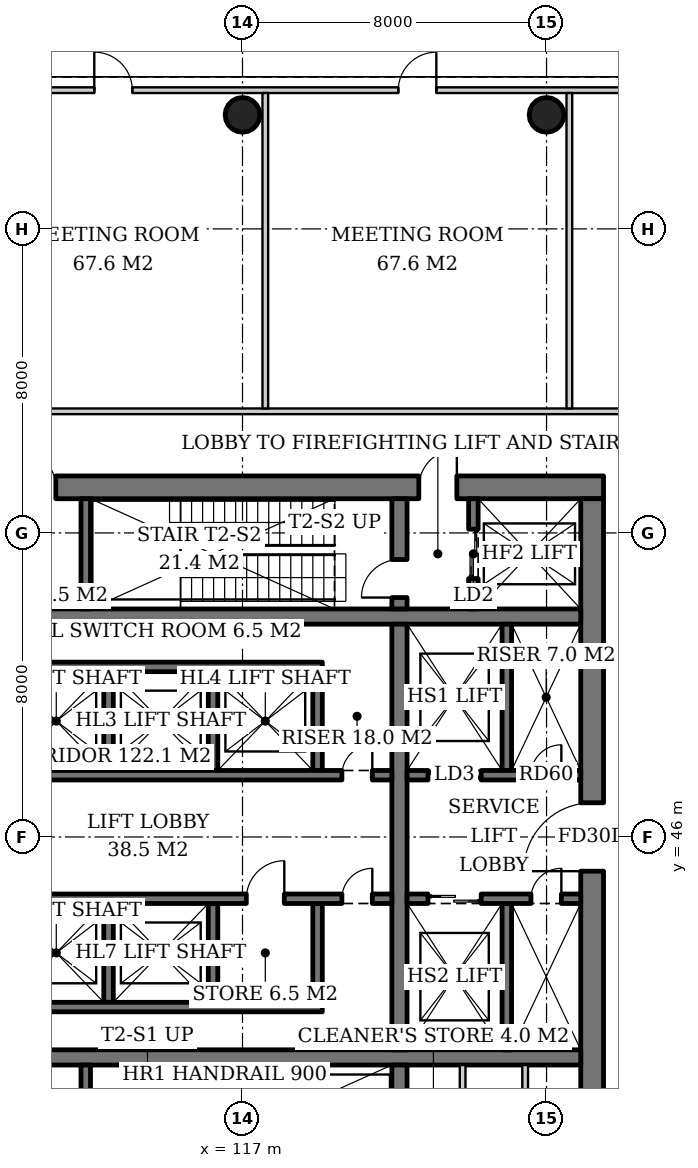
"""IFC4 building model, lengths in metres.
Left out: names, types, materials, properties, quantities, classifications, styles, units other than length and angle.
Written with IfcOpenShell. Run it as: python <this file> out.ifc"""

import sys

from ifc_helpers import new_model, si_unit, direction, frame, frame_2d, origin, origin_2d, place, context, subcontext, project, spatial, rectangle, hollow_circle, extrude, element, fill, save


model = new_model("IFC4")
c1 = context("Model", 3, precision=1e-05, world=origin(), true_north=direction((0.0, 1.0)))
c2 = subcontext(c1, "Body", "Model", "MODEL_VIEW")
j1 = project(units=[si_unit("LENGTHUNIT", "METRE"), si_unit("PLANEANGLEUNIT", "RADIAN")], contexts=[c1])
p1 = place(None, origin())
s1 = spatial("IfcSite", under=j1, at=p1, CompositionType="ELEMENT")
p2 = place(p1, origin())
s2 = spatial("IfcBuilding", under=s1, at=p2, CompositionType="ELEMENT")
p3 = place(p2, frame((0.0, 0.0, 11.0)))
s3 = spatial("IfcBuildingStorey", under=s2, at=p3, CompositionType="ELEMENT", Elevation=11.0)
for number, where, z_axis, x_axis in (
    (1, (125.0, 65.0, 0.0), (0.0, 0.0, 1.0), (1.0, 0.0, 0.0)),
    (2, (117.0, 65.0, 0.0), (0.0, 0.0, 1.0), (1.0, 0.0, 0.0)),
):
    element("IfcColumn", number, at=place(p3, frame(where, z_axis=z_axis, x_axis=x_axis)), inside=s3, PredefinedType="COLUMN", context=c2, shape_type="SweptSolid", body=[
        extrude(hollow_circle(Radius=0.457, WallThickness=0.03, at=origin_2d()), origin(), (0.0, 0.0, 1.0), 5.0),
    ])
p4 = place(p3, frame((107.5, 55.2, 0.0), z_axis=(0.0, 0.0, 1.0), x_axis=(1.0, 0.0, 0.0)))
e3 = element("IfcWall", 3, at=p4, inside=s3, PredefinedType="SHEAR", context=c2, shape_type="SweptSolid", body=[
    extrude(rectangle(XDim=19.0, YDim=0.6, at=frame_2d((9.5, 0.0))), origin(), (0.0, 0.0, 1.0), 5.0),
])
p5 = place(p4, frame((14.14, 0.0, 0.0)))
e4 = element("IfcOpeningElement", 4, at=p5, cuts=e3, PredefinedType="OPENING", context=c2, shape_type="SweptSolid", body=[
    extrude(rectangle(XDim=1.0, YDim=2.1, at=frame_2d((0.5, 1.05))), frame((0.0, 0.31, 0.0), z_axis=(0.0, -1.0, 0.0), x_axis=(1.0, 0.0, 0.0)), (0.0, 0.0, 1.0), 0.62),
])
p6 = place(p4, frame((1.675, 0.0, 0.0)))
e5 = element("IfcOpeningElement", 5, at=p6, cuts=e3, PredefinedType="OPENING", context=c2, shape_type="SweptSolid", body=[
    extrude(rectangle(XDim=1.0, YDim=2.1, at=frame_2d((0.5, 1.05))), frame((0.0, 0.31, 0.0), z_axis=(0.0, -1.0, 0.0), x_axis=(1.0, 0.0, 0.0)), (0.0, 0.0, 1.0), 0.62),
])
p7 = place(p4, frame((3.587, 0.0, 0.0)))
e6 = element("IfcOpeningElement", 6, at=p7, cuts=e3, PredefinedType="OPENING", context=c2, shape_type="SweptSolid", body=[
    extrude(rectangle(XDim=1.0, YDim=2.1, at=frame_2d((0.5, 1.05))), frame((0.0, 0.31, 0.0), z_axis=(0.0, -1.0, 0.0), x_axis=(1.0, 0.0, 0.0)), (0.0, 0.0, 1.0), 0.62),
])
p8 = place(p3, frame((126.2, 37.1, 0.0), z_axis=(0.0, 0.0, 1.0), x_axis=(0.0, 1.0, 0.0)))
e7 = element("IfcWall", 7, at=p8, inside=s3, PredefinedType="SHEAR", context=c2, shape_type="SweptSolid", body=[
    extrude(rectangle(XDim=17.8, YDim=0.6, at=frame_2d((8.9, 0.0))), origin(), (0.0, 0.0, 1.0), 5.0),
])
p9 = place(p8, frame((8.0, 0.0, 0.0)))
e8 = element("IfcOpeningElement", 8, at=p9, cuts=e7, PredefinedType="OPENING", context=c2, shape_type="SweptSolid", body=[
    extrude(rectangle(XDim=1.8, YDim=2.4, at=frame_2d((0.9, 1.2))), frame((0.0, 0.31, 0.0), z_axis=(0.0, -1.0, 0.0), x_axis=(1.0, 0.0, 0.0)), (0.0, 0.0, 1.0), 0.62),
])
for number, where, z_axis, x_axis in (
    (9, (108.1, 40.2, 0.0), (0.0, 0.0, 1.0), (1.0, 0.0, 0.0)),
    (10, (108.1, 51.8, 0.0), (0.0, 0.0, 1.0), (1.0, 0.0, 0.0)),
):
    element("IfcWall", number, at=place(p3, frame(where, z_axis=z_axis, x_axis=x_axis)), inside=s3, PredefinedType="SHEAR", context=c2, shape_type="SweptSolid", body=[
        extrude(rectangle(XDim=17.8, YDim=0.4, at=frame_2d((8.9, 0.0))), origin(), (0.0, 0.0, 1.0), 5.0),
    ])
p10 = place(p3, frame((121.13, 37.1, 0.0), z_axis=(0.0, 0.0, 1.0), x_axis=(0.0, 1.0, 0.0)))
e11 = element("IfcWall", 11, at=p10, inside=s3, PredefinedType="SHEAR", context=c2, shape_type="SweptSolid", body=[
    extrude(rectangle(XDim=2.9, YDim=0.4, at=frame_2d((1.45, 0.0))), origin(), (0.0, 0.0, 1.0), 5.0),
])
p11 = place(p3, frame((121.13, 40.4, 0.0), z_axis=(0.0, 0.0, 1.0), x_axis=(0.0, 1.0, 0.0)))
e12 = element("IfcWall", 12, at=p11, inside=s3, PredefinedType="SHEAR", context=c2, shape_type="SweptSolid", body=[
    extrude(rectangle(XDim=11.2, YDim=0.4, at=frame_2d((5.6, 0.0))), origin(), (0.0, 0.0, 1.0), 5.0),
])
p12 = place(p3, frame((121.13, 52.0, 0.0), z_axis=(0.0, 0.0, 1.0), x_axis=(0.0, 1.0, 0.0)))
e13 = element("IfcWall", 13, at=p12, inside=s3, PredefinedType="SHEAR", context=c2, shape_type="SweptSolid", body=[
    extrude(rectangle(XDim=2.9, YDim=0.4, at=frame_2d((1.45, 0.0))), origin(), (0.0, 0.0, 1.0), 5.0),
])
p13 = place(p12, frame((0.3, 0.0, 0.0)))
e14 = element("IfcOpeningElement", 14, at=p13, cuts=e13, PredefinedType="OPENING", context=c2, shape_type="SweptSolid", body=[
    extrude(rectangle(XDim=1.0, YDim=2.1, at=frame_2d((0.5, 1.05))), frame((0.0, 0.21, 0.0), z_axis=(0.0, -1.0, 0.0), x_axis=(1.0, 0.0, 0.0)), (0.0, 0.0, 1.0), 0.42),
])
p14 = place(p3, frame((112.875, 37.1, 0.0), z_axis=(0.0, 0.0, 1.0), x_axis=(0.0, 1.0, 0.0)))
e15 = element("IfcWall", 15, at=p14, inside=s3, PredefinedType="SHEAR", context=c2, shape_type="SweptSolid", body=[
    extrude(rectangle(XDim=2.9, YDim=0.25, at=frame_2d((1.45, 0.0))), origin(), (0.0, 0.0, 1.0), 5.0),
])
p15 = place(p14, frame((0.75, 0.0, 0.0)))
e16 = element("IfcOpeningElement", 16, at=p15, cuts=e15, PredefinedType="OPENING", context=c2, shape_type="SweptSolid", body=[
    extrude(rectangle(XDim=1.2, YDim=2.1, at=frame_2d((0.6, 1.05))), frame((0.0, 0.135, 0.0), z_axis=(0.0, -1.0, 0.0), x_axis=(1.0, 0.0, 0.0)), (0.0, 0.0, 1.0), 0.27),
])
p16 = place(p3, frame((112.875, 52.0, 0.0), z_axis=(0.0, 0.0, 1.0), x_axis=(0.0, 1.0, 0.0)))
e17 = element("IfcWall", 17, at=p16, inside=s3, PredefinedType="SHEAR", context=c2, shape_type="SweptSolid", body=[
    extrude(rectangle(XDim=2.9, YDim=0.25, at=frame_2d((1.45, 0.0))), origin(), (0.0, 0.0, 1.0), 5.0),
])
p17 = place(p3, frame((123.075, 52.0, 0.0), z_axis=(0.0, 0.0, 1.0), x_axis=(0.0, 1.0, 0.0)))
e18 = element("IfcWall", 18, at=p17, inside=s3, PredefinedType="SHEAR", context=c2, shape_type="SweptSolid", body=[
    extrude(rectangle(XDim=2.9, YDim=0.25, at=frame_2d((1.45, 0.0))), origin(), (0.0, 0.0, 1.0), 5.0),
])
p18 = place(p17, frame((0.8, 0.0, 0.0)))
e19 = element("IfcOpeningElement", 19, at=p18, cuts=e18, PredefinedType="OPENING", context=c2, shape_type="SweptSolid", body=[
    extrude(rectangle(XDim=1.3, YDim=2.2, at=frame_2d((0.65, 1.1))), frame((0.0, 0.135, 0.0), z_axis=(0.0, -1.0, 0.0), x_axis=(1.0, 0.0, 0.0)), (0.0, 0.0, 1.0), 0.27),
])
for number, where, z_axis, x_axis in (
    (20, (113.475, 47.75, 0.0), (0.0, 0.0, 1.0), (0.0, 1.0, 0.0)),
    (21, (116.225, 47.75, 0.0), (0.0, 0.0, 1.0), (0.0, 1.0, 0.0)),
    (22, (118.975, 47.75, 0.0), (0.0, 0.0, 1.0), (0.0, 1.0, 0.0)),
):
    element("IfcWall", number, at=place(p3, frame(where, z_axis=z_axis, x_axis=x_axis)), inside=s3, PredefinedType="SHEAR", context=c2, shape_type="SweptSolid", body=[
        extrude(rectangle(XDim=2.6, YDim=0.25, at=frame_2d((1.3, 0.0))), origin(), (0.0, 0.0, 1.0), 5.0),
    ])
p19 = place(p3, frame((108.1, 50.475, 0.0), z_axis=(0.0, 0.0, 1.0), x_axis=(1.0, 0.0, 0.0)))
e23 = element("IfcWall", 23, at=p19, inside=s3, PredefinedType="SHEAR", context=c2, shape_type="SweptSolid", body=[
    extrude(rectangle(XDim=11.0, YDim=0.25, at=frame_2d((5.5, 0.0))), origin(), (0.0, 0.0, 1.0), 5.0),
])
p20 = place(p3, frame((108.1, 47.625, 0.0), z_axis=(0.0, 0.0, 1.0), x_axis=(1.0, 0.0, 0.0)))
e24 = element("IfcWall", 24, at=p20, inside=s3, PredefinedType="SHEAR", context=c2, shape_type="SweptSolid", body=[
    extrude(rectangle(XDim=12.83, YDim=0.25, at=frame_2d((6.415, 0.0))), origin(), (0.0, 0.0, 1.0), 5.0),
])
p21 = place(p20, frame((11.515, 0.0, 0.0)))
e25 = element("IfcOpeningElement", 25, at=p21, cuts=e24, PredefinedType="OPENING", context=c2, shape_type="SweptSolid", body=[
    extrude(rectangle(XDim=0.8, YDim=2.0, at=frame_2d((0.4, 1.0))), frame((0.0, 0.135, 0.0), z_axis=(0.0, -1.0, 0.0), x_axis=(1.0, 0.0, 0.0)), (0.0, 0.0, 1.0), 0.27),
])
for number, where, z_axis, x_axis in (
    (26, (113.475, 44.25, 0.0), (0.0, 0.0, 1.0), (0.0, -1.0, 0.0)),
    (27, (116.225, 44.25, 0.0), (0.0, 0.0, 1.0), (0.0, -1.0, 0.0)),
    (28, (118.975, 44.25, 0.0), (0.0, 0.0, 1.0), (0.0, -1.0, 0.0)),
):
    element("IfcWall", number, at=place(p3, frame(where, z_axis=z_axis, x_axis=x_axis)), inside=s3, PredefinedType="SHEAR", context=c2, shape_type="SweptSolid", body=[
        extrude(rectangle(XDim=2.6, YDim=0.25, at=frame_2d((1.3, 0.0))), origin(), (0.0, 0.0, 1.0), 5.0),
    ])
p22 = place(p3, frame((108.1, 41.525, 0.0), z_axis=(0.0, 0.0, 1.0), x_axis=(1.0, 0.0, 0.0)))
e29 = element("IfcWall", 29, at=p22, inside=s3, PredefinedType="SHEAR", context=c2, shape_type="SweptSolid", body=[
    extrude(rectangle(XDim=11.0, YDim=0.25, at=frame_2d((5.5, 0.0))), origin(), (0.0, 0.0, 1.0), 5.0),
])
p23 = place(p3, frame((108.1, 44.375, 0.0), z_axis=(0.0, 0.0, 1.0), x_axis=(1.0, 0.0, 0.0)))
e30 = element("IfcWall", 30, at=p23, inside=s3, PredefinedType="SHEAR", context=c2, shape_type="SweptSolid", body=[
    extrude(rectangle(XDim=12.83, YDim=0.25, at=frame_2d((6.415, 0.0))), origin(), (0.0, 0.0, 1.0), 5.0),
])
p24 = place(p23, frame((9.0, 0.0, 0.0)))
e31 = element("IfcOpeningElement", 31, at=p24, cuts=e30, PredefinedType="OPENING", context=c2, shape_type="SweptSolid", body=[
    extrude(rectangle(XDim=1.0, YDim=2.1, at=frame_2d((0.5, 1.05))), frame((0.0, 0.135, 0.0), z_axis=(0.0, -1.0, 0.0), x_axis=(1.0, 0.0, 0.0)), (0.0, 0.0, 1.0), 0.27),
])
p25 = place(p23, frame((11.515, 0.0, 0.0)))
e32 = element("IfcOpeningElement", 32, at=p25, cuts=e30, PredefinedType="OPENING", context=c2, shape_type="SweptSolid", body=[
    extrude(rectangle(XDim=0.8, YDim=2.0, at=frame_2d((0.4, 1.0))), frame((0.0, 0.135, 0.0), z_axis=(0.0, -1.0, 0.0), x_axis=(1.0, 0.0, 0.0)), (0.0, 0.0, 1.0), 0.27),
])
p26 = place(p3, frame((123.955, 47.75, 0.0), z_axis=(0.0, 0.0, 1.0), x_axis=(0.0, 1.0, 0.0)))
e33 = element("IfcWall", 33, at=p26, inside=s3, PredefinedType="SHEAR", context=c2, shape_type="SweptSolid", body=[
    extrude(rectangle(XDim=3.85, YDim=0.25, at=frame_2d((1.925, 0.0))), origin(), (0.0, 0.0, 1.0), 5.0),
])
p27 = place(p3, frame((121.33, 47.625, 0.0), z_axis=(0.0, 0.0, 1.0), x_axis=(1.0, 0.0, 0.0)))
e34 = element("IfcWall", 34, at=p27, inside=s3, PredefinedType="SHEAR", context=c2, shape_type="SweptSolid", body=[
    extrude(rectangle(XDim=4.57, YDim=0.25, at=frame_2d((2.285, 0.0))), origin(), (0.0, 0.0, 1.0), 5.0),
])
p28 = place(p27, frame((0.55, 0.0, 0.0)))
e35 = element("IfcOpeningElement", 35, at=p28, cuts=e34, PredefinedType="OPENING", context=c2, shape_type="SweptSolid", body=[
    extrude(rectangle(XDim=1.4, YDim=2.4, at=frame_2d((0.7, 1.2))), frame((0.0, 0.135, 0.0), z_axis=(0.0, -1.0, 0.0), x_axis=(1.0, 0.0, 0.0)), (0.0, 0.0, 1.0), 0.27),
])
p29 = place(p27, frame((3.26, 0.0, 0.0)))
e36 = element("IfcOpeningElement", 36, at=p29, cuts=e34, PredefinedType="OPENING", context=c2, shape_type="SweptSolid", body=[
    extrude(rectangle(XDim=0.8, YDim=2.0, at=frame_2d((0.4, 1.0))), frame((0.0, 0.135, 0.0), z_axis=(0.0, -1.0, 0.0), x_axis=(1.0, 0.0, 0.0)), (0.0, 0.0, 1.0), 0.27),
])
p30 = place(p3, frame((123.955, 44.25, 0.0), z_axis=(0.0, 0.0, 1.0), x_axis=(0.0, -1.0, 0.0)))
e37 = element("IfcWall", 37, at=p30, inside=s3, PredefinedType="SHEAR", context=c2, shape_type="SweptSolid", body=[
    extrude(rectangle(XDim=3.85, YDim=0.25, at=frame_2d((1.925, 0.0))), origin(), (0.0, 0.0, 1.0), 5.0),
])
p31 = place(p3, frame((121.33, 44.375, 0.0), z_axis=(0.0, 0.0, 1.0), x_axis=(1.0, 0.0, 0.0)))
e38 = element("IfcWall", 38, at=p31, inside=s3, PredefinedType="SHEAR", context=c2, shape_type="SweptSolid", body=[
    extrude(rectangle(XDim=4.57, YDim=0.25, at=frame_2d((2.285, 0.0))), origin(), (0.0, 0.0, 1.0), 5.0),
])
p32 = place(p31, frame((0.55, 0.0, 0.0)))
e39 = element("IfcOpeningElement", 39, at=p32, cuts=e38, PredefinedType="OPENING", context=c2, shape_type="SweptSolid", body=[
    extrude(rectangle(XDim=1.4, YDim=2.4, at=frame_2d((0.7, 1.2))), frame((0.0, 0.135, 0.0), z_axis=(0.0, -1.0, 0.0), x_axis=(1.0, 0.0, 0.0)), (0.0, 0.0, 1.0), 0.27),
])
p33 = place(p31, frame((3.26, 0.0, 0.0)))
e40 = element("IfcOpeningElement", 40, at=p33, cuts=e38, PredefinedType="OPENING", context=c2, shape_type="SweptSolid", body=[
    extrude(rectangle(XDim=0.8, YDim=2.0, at=frame_2d((0.4, 1.0))), frame((0.0, 0.135, 0.0), z_axis=(0.0, -1.0, 0.0), x_axis=(1.0, 0.0, 0.0)), (0.0, 0.0, 1.0), 0.27),
])
for number, where, z_axis, x_axis in (
    (41, (122.792, 37.1, 0.0), (0.0, 0.0, 1.0), (0.0, 1.0, 0.0)),
    (42, (124.438, 37.1, 0.0), (0.0, 0.0, 1.0), (0.0, 1.0, 0.0)),
):
    element("IfcWall", number, at=place(p3, frame(where, z_axis=z_axis, x_axis=x_axis)), inside=s3, PredefinedType="SOLIDWALL", context=c2, shape_type="SweptSolid", body=[
        extrude(rectangle(XDim=2.9, YDim=0.15, at=frame_2d((1.45, 0.0))), origin(), (0.0, 0.0, 1.0), 4.7),
    ])
p34 = place(p3, frame((97.225, 57.2, 0.0), z_axis=(0.0, 0.0, 1.0), x_axis=(1.0, 0.0, 0.0)))
e43 = element("IfcWall", 43, at=p34, inside=s3, PredefinedType="PARTITIONING", context=c2, shape_type="SweptSolid", body=[
    extrude(rectangle(XDim=39.55, YDim=0.15, at=frame_2d((19.775, 0.0))), origin(), (0.0, 0.0, 1.0), 3.9),
])
p35 = place(p3, frame((97.225, 65.65, 0.0), z_axis=(0.0, 0.0, 1.0), x_axis=(1.0, 0.0, 0.0)))
e44 = element("IfcWall", 44, at=p35, inside=s3, PredefinedType="PARTITIONING", context=c2, shape_type="SweptSolid", body=[
    extrude(rectangle(XDim=39.55, YDim=0.15, at=frame_2d((19.775, 0.0))), origin(), (0.0, 0.0, 1.0), 3.2),
])
p36 = place(p35, frame((1.725, 0.0, 0.0)))
e45 = element("IfcOpeningElement", 45, at=p36, cuts=e44, PredefinedType="OPENING", context=c2, shape_type="SweptSolid", body=[
    extrude(rectangle(XDim=1.0, YDim=2.1, at=frame_2d((0.5, 1.05))), frame((0.0, 0.085, 0.0), z_axis=(0.0, -1.0, 0.0), x_axis=(1.0, 0.0, 0.0)), (0.0, 0.0, 1.0), 0.17),
])
p37 = place(p35, frame((7.875, 0.0, 0.0)))
e46 = element("IfcOpeningElement", 46, at=p37, cuts=e44, PredefinedType="OPENING", context=c2, shape_type="SweptSolid", body=[
    extrude(rectangle(XDim=1.0, YDim=2.1, at=frame_2d((0.5, 1.05))), frame((0.0, 0.085, 0.0), z_axis=(0.0, -1.0, 0.0), x_axis=(1.0, 0.0, 0.0)), (0.0, 0.0, 1.0), 0.17),
])
p38 = place(p35, frame((15.875, 0.0, 0.0)))
e47 = element("IfcOpeningElement", 47, at=p38, cuts=e44, PredefinedType="OPENING", context=c2, shape_type="SweptSolid", body=[
    extrude(rectangle(XDim=1.0, YDim=2.1, at=frame_2d((0.5, 1.05))), frame((0.0, 0.085, 0.0), z_axis=(0.0, -1.0, 0.0), x_axis=(1.0, 0.0, 0.0)), (0.0, 0.0, 1.0), 0.17),
])
p39 = place(p35, frame((23.875, 0.0, 0.0)))
e48 = element("IfcOpeningElement", 48, at=p39, cuts=e44, PredefinedType="OPENING", context=c2, shape_type="SweptSolid", body=[
    extrude(rectangle(XDim=1.0, YDim=2.1, at=frame_2d((0.5, 1.05))), frame((0.0, 0.085, 0.0), z_axis=(0.0, -1.0, 0.0), x_axis=(1.0, 0.0, 0.0)), (0.0, 0.0, 1.0), 0.17),
])
p40 = place(p35, frame((31.875, 0.0, 0.0)))
e49 = element("IfcOpeningElement", 49, at=p40, cuts=e44, PredefinedType="OPENING", context=c2, shape_type="SweptSolid", body=[
    extrude(rectangle(XDim=1.0, YDim=2.1, at=frame_2d((0.5, 1.05))), frame((0.0, 0.085, 0.0), z_axis=(0.0, -1.0, 0.0), x_axis=(1.0, 0.0, 0.0)), (0.0, 0.0, 1.0), 0.17),
])
p41 = place(p35, frame((37.425, 0.0, 0.0)))
e50 = element("IfcOpeningElement", 50, at=p41, cuts=e44, PredefinedType="OPENING", context=c2, shape_type="SweptSolid", body=[
    extrude(rectangle(XDim=1.0, YDim=2.1, at=frame_2d((0.5, 1.05))), frame((0.0, 0.085, 0.0), z_axis=(0.0, -1.0, 0.0), x_axis=(1.0, 0.0, 0.0)), (0.0, 0.0, 1.0), 0.17),
])
for number, where, z_axis, x_axis in (
    (51, (117.6, 57.275, 0.0), (0.0, 0.0, 1.0), (0.0, 1.0, 0.0)),
    (52, (125.6, 57.275, 0.0), (0.0, 0.0, 1.0), (0.0, 1.0, 0.0)),
):
    element("IfcWall", number, at=place(p3, frame(where, z_axis=z_axis, x_axis=x_axis)), inside=s3, PredefinedType="PARTITIONING", context=c2, shape_type="SweptSolid", body=[
        extrude(rectangle(XDim=8.3, YDim=0.15, at=frame_2d((4.15, 0.0))), origin(), (0.0, 0.0, 1.0), 4.15),
    ])
p42 = place(p18, origin())
e53 = element("IfcDoor", 53, at=p42, inside=s3, OperationType="DOUBLE_DOOR_SLIDING", PredefinedType="DOOR", context=c2, shape_type="SweptSolid", body=[
    extrude(rectangle(XDim=1.3, YDim=2.2, at=frame_2d((0.65, 1.1))), frame((0.0, 0.025, 0.0), z_axis=(0.0, -1.0, 0.0), x_axis=(1.0, 0.0, 0.0)), (0.0, 0.0, 1.0), 0.05),
])
fill(e19, e53)
p43 = place(p21, origin())
e54 = element("IfcDoor", 54, at=p43, inside=s3, OperationType="SINGLE_SWING_RIGHT", PredefinedType="DOOR", context=c2, shape_type="SweptSolid", body=[
    extrude(rectangle(XDim=0.8, YDim=2.0, at=frame_2d((0.4, 1.0))), frame((0.0, 0.025, 0.0), z_axis=(0.0, -1.0, 0.0), x_axis=(1.0, 0.0, 0.0)), (0.0, 0.0, 1.0), 0.05),
])
fill(e25, e54)
p44 = place(p24, origin())
e55 = element("IfcDoor", 55, at=p44, inside=s3, OperationType="SINGLE_SWING_RIGHT", PredefinedType="DOOR", context=c2, shape_type="SweptSolid", body=[
    extrude(rectangle(XDim=1.0, YDim=2.1, at=frame_2d((0.5, 1.05))), frame((0.0, 0.025, 0.0), z_axis=(0.0, -1.0, 0.0), x_axis=(1.0, 0.0, 0.0)), (0.0, 0.0, 1.0), 0.05),
])
fill(e31, e55)
p45 = place(p25, origin())
e56 = element("IfcDoor", 56, at=p45, inside=s3, OperationType="SINGLE_SWING_RIGHT", PredefinedType="DOOR", context=c2, shape_type="SweptSolid", body=[
    extrude(rectangle(XDim=0.8, YDim=2.0, at=frame_2d((0.4, 1.0))), frame((0.0, 0.025, 0.0), z_axis=(0.0, -1.0, 0.0), x_axis=(1.0, 0.0, 0.0)), (0.0, 0.0, 1.0), 0.05),
])
fill(e32, e56)
p46 = place(p28, origin())
e57 = element("IfcDoor", 57, at=p46, inside=s3, OperationType="DOUBLE_DOOR_SLIDING", PredefinedType="DOOR", context=c2, shape_type="SweptSolid", body=[
    extrude(rectangle(XDim=1.4, YDim=2.4, at=frame_2d((0.7, 1.2))), frame((0.0, 0.025, 0.0), z_axis=(0.0, -1.0, 0.0), x_axis=(1.0, 0.0, 0.0)), (0.0, 0.0, 1.0), 0.05),
])
fill(e35, e57)
p47 = place(p29, origin())
e58 = element("IfcDoor", 58, at=p47, inside=s3, OperationType="SINGLE_SWING_RIGHT", PredefinedType="DOOR", context=c2, shape_type="SweptSolid", body=[
    extrude(rectangle(XDim=0.8, YDim=2.0, at=frame_2d((0.4, 1.0))), frame((0.0, 0.025, 0.0), z_axis=(0.0, -1.0, 0.0), x_axis=(1.0, 0.0, 0.0)), (0.0, 0.0, 1.0), 0.05),
])
fill(e36, e58)
p48 = place(p32, origin())
e59 = element("IfcDoor", 59, at=p48, inside=s3, OperationType="DOUBLE_DOOR_SLIDING", PredefinedType="DOOR", context=c2, shape_type="SweptSolid", body=[
    extrude(rectangle(XDim=1.4, YDim=2.4, at=frame_2d((0.7, 1.2))), frame((0.0, 0.025, 0.0), z_axis=(0.0, -1.0, 0.0), x_axis=(1.0, 0.0, 0.0)), (0.0, 0.0, 1.0), 0.05),
])
fill(e39, e59)
p49 = place(p33, origin())
e60 = element("IfcDoor", 60, at=p49, inside=s3, OperationType="SINGLE_SWING_RIGHT", PredefinedType="DOOR", context=c2, shape_type="SweptSolid", body=[
    extrude(rectangle(XDim=0.8, YDim=2.0, at=frame_2d((0.4, 1.0))), frame((0.0, 0.025, 0.0), z_axis=(0.0, -1.0, 0.0), x_axis=(1.0, 0.0, 0.0)), (0.0, 0.0, 1.0), 0.05),
])
fill(e40, e60)
p50 = place(p13, origin())
e61 = element("IfcDoor", 61, at=p50, inside=s3, OperationType="SINGLE_SWING_LEFT", PredefinedType="DOOR", context=c2, shape_type="SweptSolid", body=[
    extrude(rectangle(XDim=1.0, YDim=2.1, at=frame_2d((0.5, 1.05))), frame((0.0, 0.025, 0.0), z_axis=(0.0, -1.0, 0.0), x_axis=(1.0, 0.0, 0.0)), (0.0, 0.0, 1.0), 0.05),
])
fill(e14, e61)
p51 = place(p5, origin())
e62 = element("IfcDoor", 62, at=p51, inside=s3, OperationType="SINGLE_SWING_RIGHT", PredefinedType="DOOR", context=c2, shape_type="SweptSolid", body=[
    extrude(rectangle(XDim=1.0, YDim=2.1, at=frame_2d((0.5, 1.05))), frame((0.0, 0.025, 0.0), z_axis=(0.0, -1.0, 0.0), x_axis=(1.0, 0.0, 0.0)), (0.0, 0.0, 1.0), 0.05),
])
fill(e4, e62)
p52 = place(p9, origin())
e63 = element("IfcDoor", 63, at=p52, inside=s3, OperationType="DOUBLE_DOOR_SINGLE_SWING", PredefinedType="DOOR", context=c2, shape_type="SweptSolid", body=[
    extrude(rectangle(XDim=1.8, YDim=2.4, at=frame_2d((0.9, 1.2))), frame((0.0, 0.025, 0.0), z_axis=(0.0, -1.0, 0.0), x_axis=(1.0, 0.0, 0.0)), (0.0, 0.0, 1.0), 0.05),
])
fill(e8, e63)
p53 = place(p7, origin())
e64 = element("IfcDoor", 64, at=p53, inside=s3, OperationType="SINGLE_SWING_LEFT", PredefinedType="DOOR", context=c2, shape_type="SweptSolid", body=[
    extrude(rectangle(XDim=1.0, YDim=2.1, at=frame_2d((0.5, 1.05))), frame((0.0, -0.24, 0.0), z_axis=(0.0, -1.0, 0.0), x_axis=(1.0, 0.0, 0.0)), (0.0, 0.0, 1.0), 0.05),
])
fill(e6, e64)
p54 = place(p38, origin())
e65 = element("IfcDoor", 65, at=p54, inside=s3, OperationType="SINGLE_SWING_LEFT", PredefinedType="DOOR", context=c2, shape_type="SweptSolid", body=[
    extrude(rectangle(XDim=1.0, YDim=2.1, at=frame_2d((0.5, 1.05))), frame((0.0, 0.025, 0.0), z_axis=(0.0, -1.0, 0.0), x_axis=(1.0, 0.0, 0.0)), (0.0, 0.0, 1.0), 0.05),
])
fill(e47, e65)
p55 = place(p39, origin())
e66 = element("IfcDoor", 66, at=p55, inside=s3, OperationType="SINGLE_SWING_RIGHT", PredefinedType="DOOR", context=c2, shape_type="SweptSolid", body=[
    extrude(rectangle(XDim=1.0, YDim=2.1, at=frame_2d((0.5, 1.05))), frame((0.0, 0.025, 0.0), z_axis=(0.0, -1.0, 0.0), x_axis=(1.0, 0.0, 0.0)), (0.0, 0.0, 1.0), 0.05),
])
fill(e48, e66)
save(model, sys.argv[1])
